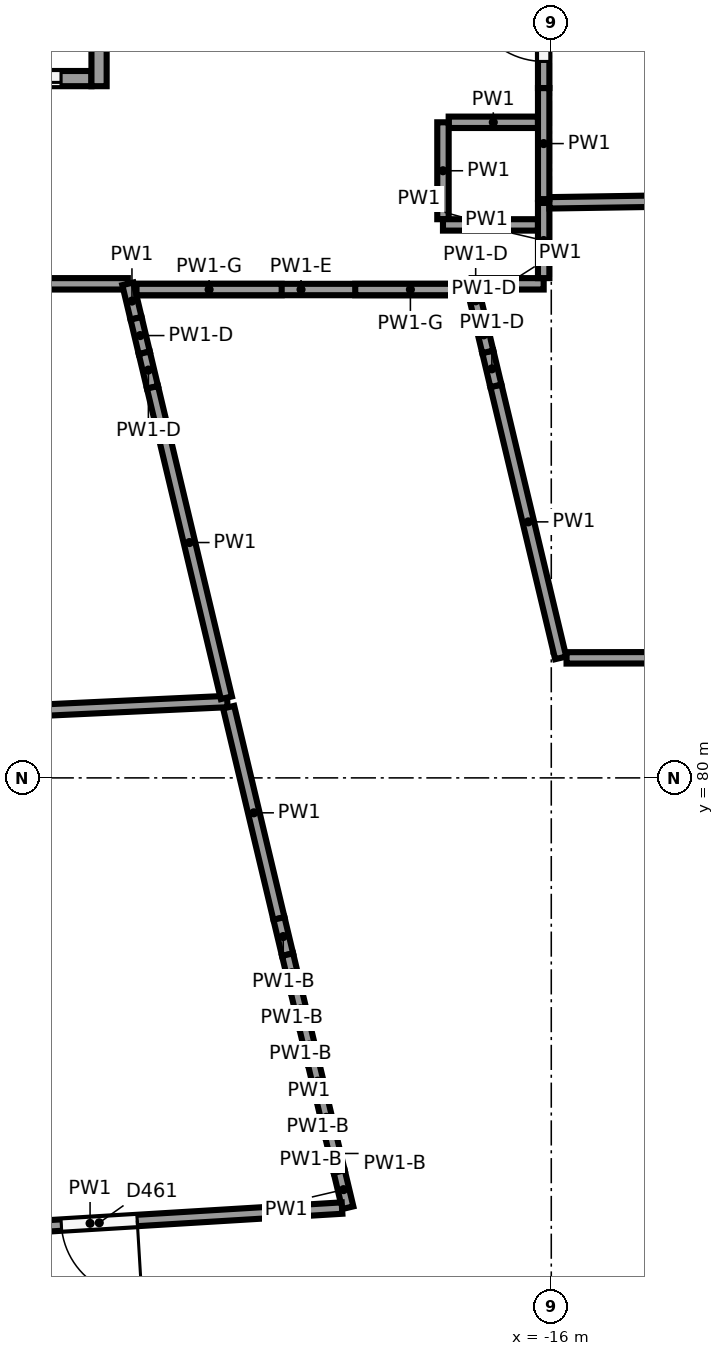
"""IFC4 building model, lengths in metres.
Left out: names, types, materials, properties, quantities, classifications, styles, units other than length and angle.
Written with IfcOpenShell. Run it as: python <this file> out.ifc"""

import sys

from ifc_helpers import new_model, si_unit, direction, frame, frame_2d, origin, origin_2d, place, context, subcontext, project, spatial, rectangle, circle, extrude, element, fill, save


model = new_model("IFC4")
c1 = context("Model", 3, precision=1e-05, world=origin(), true_north=direction((0.0, 1.0)))
c2 = subcontext(c1, "Body", "Model", "MODEL_VIEW")
j1 = project(units=[si_unit("LENGTHUNIT", "METRE"), si_unit("PLANEANGLEUNIT", "RADIAN")], contexts=[c1])
p1 = place(None, origin())
s1 = spatial("IfcSite", under=j1, at=p1, CompositionType="ELEMENT")
p2 = place(p1, origin())
s2 = spatial("IfcBuilding", under=s1, at=p2, CompositionType="ELEMENT")
p3 = place(p2, frame((0.0, 0.0, -4.0)))
s3 = spatial("IfcBuildingStorey", under=s2, at=p3, CompositionType="ELEMENT", Elevation=-4.0)
p4 = place(p3, frame((-16.698, 75.53, -0.4), z_axis=(0.0, 0.0, 1.0), x_axis=(1.0, 0.0, 0.0)))
e1 = element("IfcColumn", 1, at=p4, inside=s3, PredefinedType="COLUMN", context=c2, shape_type="SweptSolid", body=[
    extrude(circle(Radius=0.4, at=origin_2d()), origin(), (0.0, 0.0, 1.0), 4.4),
])
p5 = place(p3, frame((-17.127, 77.332, -0.4), z_axis=(0.0, 0.0, 1.0), x_axis=(1.0, 0.0, 0.0)))
e2 = element("IfcColumn", 2, at=p5, inside=s3, PredefinedType="COLUMN", context=c2, shape_type="SweptSolid", body=[
    extrude(circle(Radius=0.35, at=origin_2d()), origin(), (0.0, 0.0, 1.0), 4.4),
])
p6 = place(p3, frame((-19.119, 85.698, -1.2), z_axis=(0.0, 0.0, 1.0), x_axis=(1.0, 0.0, 0.0)))
e3 = element("IfcColumn", 3, at=p6, inside=s3, PredefinedType="COLUMN", context=c2, shape_type="SweptSolid", body=[
    extrude(circle(Radius=0.4, at=origin_2d()), origin(), (0.0, 0.0, 1.0), 5.2),
])
p7 = place(p3, frame((-19.627, 89.904, -1.2), z_axis=(0.0, 0.0, 1.0), x_axis=(1.0, 0.0, 0.0)))
e4 = element("IfcColumn", 4, at=p7, inside=s3, PredefinedType="COLUMN", context=c2, shape_type="SweptSolid", body=[
    extrude(circle(Radius=0.55, at=origin_2d()), origin(), (0.0, 0.0, 1.0), 5.2),
])
p8 = place(p3, frame((-21.95, 92.1, -1.2), z_axis=(0.0, 0.0, 1.0), x_axis=(0.0, -1.0, 0.0)))
e5 = element("IfcWall", 5, at=p8, inside=s3, PredefinedType="SHEAR", context=c2, shape_type="SweptSolid", body=[
    extrude(rectangle(XDim=3.0, YDim=0.2, at=frame_2d((1.5, 0.0))), origin(), (0.0, 0.0, 1.0), 4.8),
])
p9 = place(p3, frame((-22.05, 89.2, -1.2), z_axis=(0.0, 0.0, 1.0), x_axis=(-1.0, 0.0, 0.0)))
e6 = element("IfcWall", 6, at=p9, inside=s3, PredefinedType="SHEAR", context=c2, shape_type="SweptSolid", body=[
    extrude(rectangle(XDim=1.9, YDim=0.2, at=frame_2d((0.95, 0.0))), origin(), (0.0, 0.0, 1.0), 4.8),
])
p10 = place(p9, frame((0.4, 0.0, 1.2)))
e7 = element("IfcOpeningElement", 7, at=p10, cuts=e6, PredefinedType="OPENING", context=c2, shape_type="SweptSolid", body=[
    extrude(rectangle(XDim=1.1, YDim=2.1, at=frame_2d((0.55, 1.05))), frame((0.0, 0.11, 0.0), z_axis=(0.0, -1.0, 0.0), x_axis=(1.0, 0.0, 0.0)), (0.0, 0.0, 1.0), 0.22),
])
p11 = place(p3, frame((-15.876, 81.579, 0.0), z_axis=(0.0, 0.0, 1.0), x_axis=(-0.231653421041, 0.972798382256, 0.0)))
e8 = element("IfcWall", 8, at=p11, inside=s3, PredefinedType="PARTITIONING", context=c2, shape_type="SweptSolid", body=[
    extrude(rectangle(XDim=3.679, YDim=0.15, at=frame_2d((1.84, 0.0))), origin(), (0.0, 0.0, 1.0), 3.6),
])
p12 = place(p3, frame((-16.729, 85.158, 0.0), z_axis=(0.0, 0.0, 1.0), x_axis=(-0.231405261986, 0.972857443167, 0.0)))
e9 = element("IfcWall", 9, at=p12, inside=s3, PredefinedType="PARTITIONING", context=c2, shape_type="SweptSolid", body=[
    extrude(rectangle(XDim=0.46, YDim=0.15, at=frame_2d((0.23, 0.0))), origin(), (0.0, 0.0, 1.0), 2.3),
])
p13 = place(p3, frame((-16.835, 85.605, 0.0), z_axis=(0.0, 0.0, 1.0), x_axis=(-0.231524805806, 0.972829000542, 0.0)))
e10 = element("IfcWall", 10, at=p13, inside=s3, PredefinedType="PARTITIONING", context=c2, shape_type="SweptSolid", body=[
    extrude(rectangle(XDim=0.46, YDim=0.15, at=frame_2d((0.23, 0.0))), origin(), (0.0, 0.0, 1.0), 2.3),
])
p14 = place(p3, frame((-16.941, 86.052, 0.0), z_axis=(0.0, 0.0, 1.0), x_axis=(-0.231907494809, 0.972737844361, 0.0)))
e11 = element("IfcWall", 11, at=p14, inside=s3, PredefinedType="PARTITIONING", context=c2, shape_type="SweptSolid", body=[
    extrude(rectangle(XDim=0.46, YDim=0.15, at=frame_2d((0.23, 0.0))), origin(), (0.0, 0.0, 1.0), 2.3),
])
p15 = place(p3, frame((-17.048, 86.5, 0.0), z_axis=(0.0, 0.0, 1.0), x_axis=(1.0, 0.0, 0.0)))
e12 = element("IfcWall", 12, at=p15, inside=s3, PredefinedType="PARTITIONING", context=c2, shape_type="SweptSolid", body=[
    extrude(rectangle(XDim=0.948, YDim=0.15, at=frame_2d((0.474, 0.0))), origin(), (0.0, 0.0, 1.0), 3.6),
])
p16 = place(p3, frame((-16.1, 86.575, 0.0), z_axis=(0.0, 0.0, 1.0), x_axis=(0.0, 1.0, 0.0)))
e13 = element("IfcWall", 13, at=p16, inside=s3, PredefinedType="PARTITIONING", context=c2, shape_type="SweptSolid", body=[
    extrude(rectangle(XDim=0.989, YDim=0.15, at=frame_2d((0.495, 0.0))), origin(), (0.0, 0.0, 1.0), 3.6),
])
p17 = place(p3, frame((-16.025, 87.565, 0.0), z_axis=(0.0, 0.0, 1.0), x_axis=(0.999882927084, 0.015301376583, 0.0)))
e14 = element("IfcWall", 14, at=p17, inside=s3, PredefinedType="PARTITIONING", context=c2, shape_type="SweptSolid", body=[
    extrude(rectangle(XDim=8.855, YDim=0.15, at=frame_2d((4.428, 0.0))), origin(), (0.0, 0.0, 1.0), 3.6),
])
p18 = place(p3, frame((-6.538, 81.59, 0.0), z_axis=(0.0, 0.0, 1.0), x_axis=(-0.99999932727, -0.001159939114, 0.0)))
e15 = element("IfcWall", 15, at=p18, inside=s3, PredefinedType="PARTITIONING", context=c2, shape_type="SweptSolid", body=[
    extrude(rectangle(XDim=9.261, YDim=0.15, at=frame_2d((4.63, 0.0))), origin(), (0.0, 0.0, 1.0), 3.6),
])
p19 = place(p3, frame((-16.1, 87.614, 0.0), z_axis=(0.0, 0.0, 1.0), x_axis=(0.0, 1.0, 0.0)))
e16 = element("IfcWall", 16, at=p19, inside=s3, PredefinedType="PARTITIONING", context=c2, shape_type="SweptSolid", body=[
    extrude(rectangle(XDim=1.461, YDim=0.15, at=frame_2d((0.731, 0.0))), origin(), (0.0, 0.0, 1.0), 3.6),
])
p20 = place(p3, frame((-16.1, 89.076, 0.0), z_axis=(0.0, 0.0, 1.0), x_axis=(0.0, 1.0, 0.0)))
e17 = element("IfcWall", 17, at=p20, inside=s3, PredefinedType="PARTITIONING", context=c2, shape_type="SweptSolid", body=[
    extrude(rectangle(XDim=1.461, YDim=0.15, at=frame_2d((0.731, 0.0))), origin(), (0.0, 0.0, 1.0), 2.3),
])
p21 = place(p20, frame((0.35, 0.0, 0.0)))
e18 = element("IfcOpeningElement", 18, at=p21, cuts=e17, PredefinedType="OPENING", context=c2, shape_type="SweptSolid", body=[
    extrude(rectangle(XDim=1.0, YDim=2.1, at=frame_2d((0.5, 1.05))), frame((0.0, 0.085, 0.0), z_axis=(0.0, -1.0, 0.0), x_axis=(1.0, 0.0, 0.0)), (0.0, 0.0, 1.0), 0.17),
])
p22 = place(p3, frame((-29.346, 80.579, 0.0), z_axis=(0.0, 0.0, 1.0), x_axis=(0.998901839674, 0.04685205113, 0.0)))
e19 = element("IfcWall", 19, at=p22, inside=s3, PredefinedType="PARTITIONING", context=c2, shape_type="SweptSolid", body=[
    extrude(rectangle(XDim=9.093, YDim=0.15, at=frame_2d((4.546, 0.0))), origin(), (0.0, 0.0, 1.0), 3.6),
])
p23 = place(p3, frame((-20.245, 80.93, 0.0), z_axis=(0.0, 0.0, 1.0), x_axis=(0.231605127585, -0.972809881157, 0.0)))
e20 = element("IfcWall", 20, at=p23, inside=s3, PredefinedType="PARTITIONING", context=c2, shape_type="SweptSolid", body=[
    extrude(rectangle(XDim=2.858, YDim=0.15, at=frame_2d((1.429, 0.0))), origin(), (0.0, 0.0, 1.0), 3.6),
])
for number, where, z_axis, x_axis in (
    (21, (-19.583, 78.15, 0.0), (0.0, 0.0, 1.0), (0.232, -0.973, 0.0)),
    (22, (-19.47, 77.675, 0.0), (0.0, 0.0, 1.0), (0.232, -0.973, 0.0)),
):
    element("IfcWall", number, at=place(p3, frame(where, z_axis=z_axis, x_axis=x_axis)), inside=s3, PredefinedType="PARTITIONING", context=c2, shape_type="SweptSolid", body=[
        extrude(rectangle(XDim=0.489, YDim=0.15, at=frame_2d((0.244, 0.0))), origin(), (0.0, 0.0, 1.0), 2.5),
    ])
p24 = place(p3, frame((-19.356, 77.199, 0.0), z_axis=(0.0, 0.0, 1.0), x_axis=(0.231125590896, -0.972923923662, 0.0)))
e23 = element("IfcWall", 23, at=p24, inside=s3, PredefinedType="PARTITIONING", context=c2, shape_type="SweptSolid", body=[
    extrude(rectangle(XDim=0.489, YDim=0.15, at=frame_2d((0.245, 0.0))), origin(), (0.0, 0.0, 1.0), 2.5),
])
p25 = place(p3, frame((-19.243, 76.723, 0.0), z_axis=(0.0, 0.0, 1.0), x_axis=(0.23218302533, -0.972672114717, 0.0)))
e24 = element("IfcWall", 24, at=p25, inside=s3, PredefinedType="PARTITIONING", context=c2, shape_type="SweptSolid", body=[
    extrude(rectangle(XDim=0.489, YDim=0.15, at=frame_2d((0.245, 0.0))), origin(), (0.0, 0.0, 1.0), 3.6),
])
p26 = place(p3, frame((-19.13, 76.248, 0.0), z_axis=(0.0, 0.0, 1.0), x_axis=(0.231237895867, -0.972897237901, 0.0)))
e25 = element("IfcWall", 25, at=p26, inside=s3, PredefinedType="PARTITIONING", context=c2, shape_type="SweptSolid", body=[
    extrude(rectangle(XDim=0.489, YDim=0.15, at=frame_2d((0.244, 0.0))), origin(), (0.0, 0.0, 1.0), 2.5),
])
p27 = place(p3, frame((-19.017, 75.772, 0.0), z_axis=(0.0, 0.0, 1.0), x_axis=(0.231598034095, -0.972811569937, 0.0)))
e26 = element("IfcWall", 26, at=p27, inside=s3, PredefinedType="PARTITIONING", context=c2, shape_type="SweptSolid", body=[
    extrude(rectangle(XDim=0.489, YDim=0.15, at=frame_2d((0.245, 0.0))), origin(), (0.0, 0.0, 1.0), 2.5),
])
p28 = place(p3, frame((-18.904, 75.296, 0.0), z_axis=(0.0, 0.0, 1.0), x_axis=(0.23171054262, -0.972784778067, 0.0)))
e27 = element("IfcWall", 27, at=p28, inside=s3, PredefinedType="PARTITIONING", context=c2, shape_type="SweptSolid", body=[
    extrude(rectangle(XDim=0.489, YDim=0.15, at=frame_2d((0.244, 0.0))), origin(), (0.0, 0.0, 1.0), 2.5),
])
p29 = place(p3, frame((-18.79, 74.821, 0.0), z_axis=(0.0, 0.0, 1.0), x_axis=(0.23171054262, -0.972784778067, 0.0)))
e28 = element("IfcWall", 28, at=p29, inside=s3, PredefinedType="PARTITIONING", context=c2, shape_type="SweptSolid", body=[
    extrude(rectangle(XDim=0.489, YDim=0.15, at=frame_2d((0.244, 0.0))), origin(), (0.0, 0.0, 1.0), 3.6),
])
p30 = place(p3, frame((-18.753, 74.341, 0.0), z_axis=(0.0, 0.0, 1.0), x_axis=(-0.998168227597, -0.060499499305, 0.0)))
e29 = element("IfcWall", 29, at=p30, inside=s3, PredefinedType="PARTITIONING", context=c2, shape_type="SweptSolid", body=[
    extrude(rectangle(XDim=6.642, YDim=0.15, at=frame_2d((3.321, 0.0))), origin(), (0.0, 0.0, 1.0), 3.6),
])
p31 = place(p30, frame((2.7, 0.0, 0.0)))
e30 = element("IfcOpeningElement", 30, at=p31, cuts=e29, PredefinedType="OPENING", context=c2, shape_type="SweptSolid", body=[
    extrude(rectangle(XDim=1.0, YDim=2.1, at=frame_2d((0.5, 1.05))), frame((0.0, 0.085, 0.0), z_axis=(0.0, -1.0, 0.0), x_axis=(1.0, 0.0, 0.0)), (0.0, 0.0, 1.0), 0.17),
])
p32 = place(p3, frame((-29.825, 86.5, 0.0), z_axis=(0.0, 0.0, 1.0), x_axis=(1.0, 0.0, 0.0)))
e31 = element("IfcWall", 31, at=p32, inside=s3, PredefinedType="PARTITIONING", context=c2, shape_type="SweptSolid", body=[
    extrude(rectangle(XDim=8.254, YDim=0.15, at=frame_2d((4.127, 0.0))), origin(), (0.0, 0.0, 1.0), 3.6),
])
p33 = place(p32, frame((3.7, 0.0, 0.0)))
e32 = element("IfcOpeningElement", 32, at=p33, cuts=e31, PredefinedType="OPENING", context=c2, shape_type="SweptSolid", body=[
    extrude(rectangle(XDim=1.0, YDim=2.1, at=frame_2d((0.5, 1.05))), frame((0.0, 0.085, 0.0), z_axis=(0.0, -1.0, 0.0), x_axis=(1.0, 0.0, 0.0)), (0.0, 0.0, 1.0), 0.17),
])
p34 = place(p3, frame((-21.571, 86.5, 0.0), z_axis=(0.0, 0.0, 1.0), x_axis=(0.231809170102, -0.972761280406, 0.0)))
e33 = element("IfcWall", 33, at=p34, inside=s3, PredefinedType="PARTITIONING", context=c2, shape_type="SweptSolid", body=[
    extrude(rectangle(XDim=0.467, YDim=0.15, at=frame_2d((0.233, 0.0))), origin(), (0.0, 0.0, 1.0), 3.6),
])
for number, where, z_axis, x_axis in (
    (34, (-21.463, 86.046, 0.0), (0.0, 0.0, 1.0), (0.231, -0.973, 0.0)),
    (35, (-21.355, 85.592, 0.0), (0.0, 0.0, 1.0), (0.232, -0.973, 0.0)),
):
    element("IfcWall", number, at=place(p3, frame(where, z_axis=z_axis, x_axis=x_axis)), inside=s3, PredefinedType="PARTITIONING", context=c2, shape_type="SweptSolid", body=[
        extrude(rectangle(XDim=0.467, YDim=0.15, at=frame_2d((0.233, 0.0))), origin(), (0.0, 0.0, 1.0), 2.3),
    ])
p35 = place(p3, frame((-21.247, 85.138, 0.0), z_axis=(0.0, 0.0, 1.0), x_axis=(0.231615286229, -0.972807462546, 0.0)))
e36 = element("IfcWall", 36, at=p35, inside=s3, PredefinedType="PARTITIONING", context=c2, shape_type="SweptSolid", body=[
    extrude(rectangle(XDim=4.198, YDim=0.15, at=frame_2d((2.099, 0.0))), origin(), (0.0, 0.0, 1.0), 3.6),
])
p36 = place(p3, frame((-16.176, 88.625, 0.0), z_axis=(0.0, 0.0, 1.0), x_axis=(-1.0, 0.0, 0.0)))
e37 = element("IfcWall", 37, at=p36, inside=s3, PredefinedType="PARTITIONING", context=c2, shape_type="SweptSolid", body=[
    extrude(rectangle(XDim=1.174, YDim=0.15, at=frame_2d((0.587, 0.0))), origin(), (0.0, 0.0, 1.0), 3.6),
])
p37 = place(p3, frame((-17.425, 88.625, 0.0), z_axis=(0.0, 0.0, 1.0), x_axis=(0.0, -1.0, 0.0)))
e38 = element("IfcWall", 38, at=p37, inside=s3, PredefinedType="PARTITIONING", context=c2, shape_type="SweptSolid", body=[
    extrude(rectangle(XDim=1.275, YDim=0.15, at=frame_2d((0.637, 0.0))), origin(), (0.0, 0.0, 1.0), 3.6),
])
p38 = place(p3, frame((-17.425, 87.275, 0.0), z_axis=(0.0, 0.0, 1.0), x_axis=(1.0, 0.0, 0.0)))
e39 = element("IfcWall", 39, at=p38, inside=s3, PredefinedType="PARTITIONING", context=c2, shape_type="SweptSolid", body=[
    extrude(rectangle(XDim=1.249, YDim=0.15, at=frame_2d((0.625, 0.0))), origin(), (0.0, 0.0, 1.0), 3.6),
])
p39 = place(p3, frame((-21.457, 86.425, 0.0), z_axis=(0.0, 0.0, 1.0), x_axis=(1.0, 0.0, 0.0)))
e40 = element("IfcWall", 40, at=p39, inside=s3, PredefinedType="PARTITIONING", context=c2, shape_type="SweptSolid", body=[
    extrude(rectangle(XDim=4.33, YDim=0.15, at=frame_2d((2.165, 0.0))), origin(), (0.0, 0.0, 1.0), 2.85),
])
p40 = place(p3, frame((-21.457, 86.425, 2.85), z_axis=(0.0, 0.0, 1.0), x_axis=(1.0, 0.0, 0.0)))
e41 = element("IfcWall", 41, at=p40, inside=s3, PredefinedType="PARTITIONING", context=c2, shape_type="SweptSolid", body=[
    extrude(rectangle(XDim=1.91, YDim=0.15, at=frame_2d((0.955, 0.0))), origin(), (0.0, 0.0, 1.0), 0.75),
])
p41 = place(p3, frame((-18.579, 86.425, 2.85), z_axis=(0.0, 0.0, 1.0), x_axis=(1.0, 0.0, 0.0)))
e42 = element("IfcWall", 42, at=p41, inside=s3, PredefinedType="PARTITIONING", context=c2, shape_type="SweptSolid", body=[
    extrude(rectangle(XDim=1.452, YDim=0.15, at=frame_2d((0.726, 0.0))), origin(), (0.0, 0.0, 1.0), 0.75),
])
p42 = place(p10, origin())
e43 = element("IfcDoor", 43, at=p42, inside=s3, OperationType="SLIDING_TO_LEFT", PredefinedType="DOOR", context=c2, shape_type="SweptSolid", body=[
    extrude(rectangle(XDim=1.1, YDim=2.1, at=frame_2d((0.55, 1.05))), frame((0.0, 0.025, 0.0), z_axis=(0.0, -1.0, 0.0), x_axis=(1.0, 0.0, 0.0)), (0.0, 0.0, 1.0), 0.05),
])
fill(e7, e43)
p43 = place(p21, origin())
e44 = element("IfcDoor", 44, at=p43, inside=s3, OperationType="SINGLE_SWING_RIGHT", PredefinedType="DOOR", context=c2, shape_type="SweptSolid", body=[
    extrude(rectangle(XDim=1.0, YDim=2.1, at=frame_2d((0.5, 1.05))), frame((0.0, 0.025, 0.0), z_axis=(0.0, -1.0, 0.0), x_axis=(1.0, 0.0, 0.0)), (0.0, 0.0, 1.0), 0.05),
])
fill(e18, e44)
p44 = place(p31, origin())
e45 = element("IfcDoor", 45, at=p44, inside=s3, OperationType="SINGLE_SWING_LEFT", PredefinedType="DOOR", context=c2, shape_type="SweptSolid", body=[
    extrude(rectangle(XDim=1.0, YDim=2.1, at=frame_2d((0.5, 1.05))), frame((0.0, 0.025, 0.0), z_axis=(0.0, -1.0, 0.0), x_axis=(1.0, 0.0, 0.0)), (0.0, 0.0, 1.0), 0.05),
])
fill(e30, e45)
save(model, sys.argv[1])
